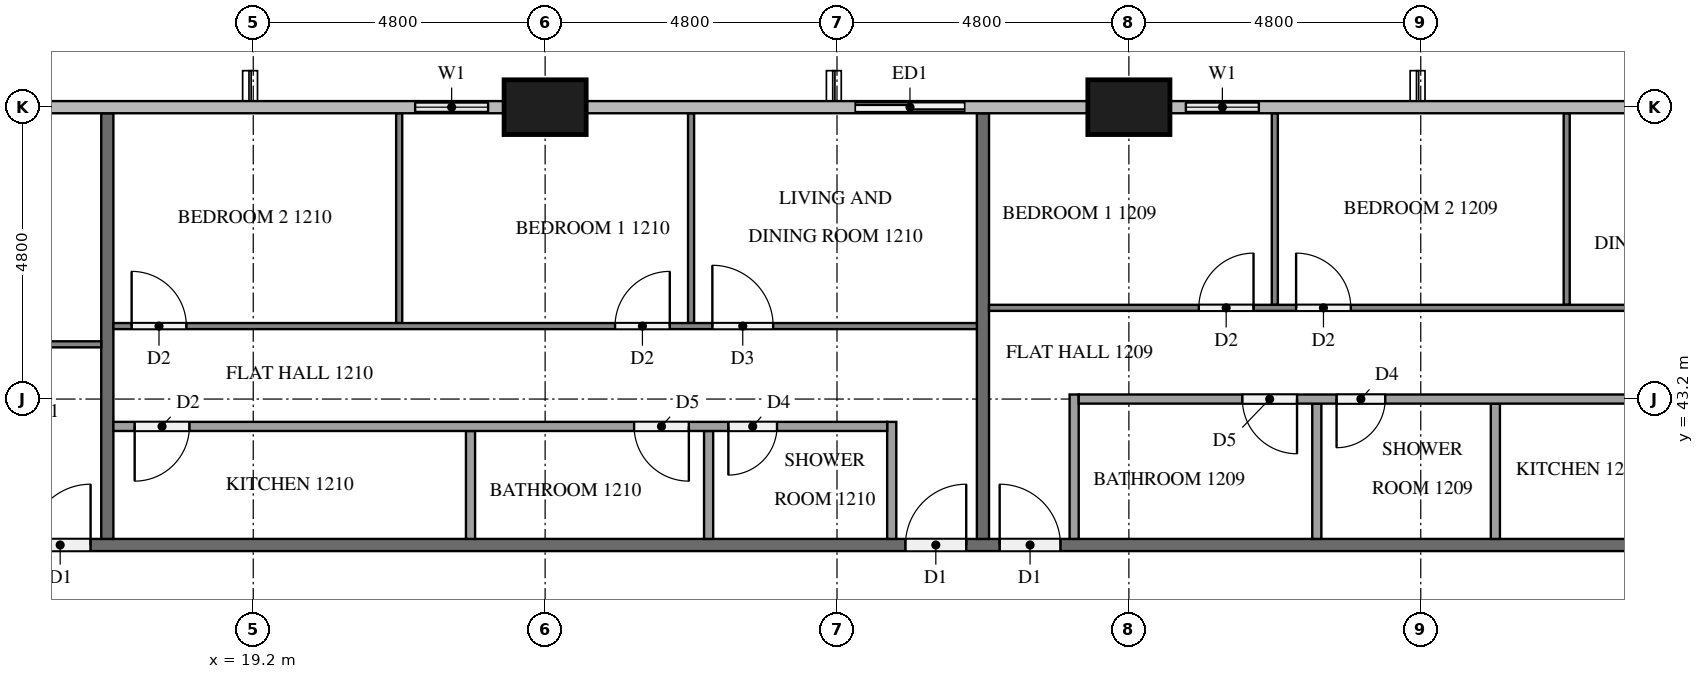
"""IFC4 building model, lengths in metres.
Left out: names, types, materials, properties, quantities, classifications, styles, units other than length and angle.
Written with IfcOpenShell. Run it as: python <this file> out.ifc"""

import sys

from ifc_helpers import new_model, si_unit, direction, frame, frame_2d, origin, origin_2d, place, context, subcontext, project, spatial, rectangle, extrude, element, fill, save


model = new_model("IFC4")
c1 = context("Model", 3, precision=1e-05, world=origin(), true_north=direction((0.0, 1.0)))
c2 = subcontext(c1, "Body", "Model", "MODEL_VIEW")
j1 = project(units=[si_unit("LENGTHUNIT", "METRE"), si_unit("PLANEANGLEUNIT", "RADIAN")], contexts=[c1])
p1 = place(None, origin())
s1 = spatial("IfcSite", under=j1, at=p1, CompositionType="ELEMENT")
p2 = place(p1, origin())
s2 = spatial("IfcBuilding", under=s1, at=p2, CompositionType="ELEMENT")
p3 = place(p2, frame((0.0, 0.0, 50.4)))
s3 = spatial("IfcBuildingStorey", under=s2, at=p3, CompositionType="ELEMENT", Elevation=50.4)
for number, where, z_axis, x_axis in (
    (1, (33.6, 48.0, 0.0), (0.0, 0.0, 1.0), (1.0, 0.0, 0.0)),
    (2, (24.0, 48.0, 0.0), (0.0, 0.0, 1.0), (1.0, 0.0, 0.0)),
):
    element("IfcColumn", number, at=place(p3, frame(where, z_axis=z_axis, x_axis=x_axis)), inside=s3, PredefinedType="COLUMN", context=c2, shape_type="SweptSolid", body=[
        extrude(rectangle(XDim=1.35, YDim=0.9, at=origin_2d()), origin(), (0.0, 0.0, 1.0), 3.1),
    ])
p4 = place(p3, frame((36.0, 48.0, 0.0), z_axis=(0.0, 0.0, 1.0), x_axis=(-1.0, 0.0, 0.0)))
e3 = element("IfcWall", 3, at=p4, inside=s3, PredefinedType="SOLIDWALL", context=c2, shape_type="SweptSolid", body=[
    extrude(rectangle(XDim=1.725, YDim=0.15, at=frame_2d((0.863, 0.0))), origin(), (0.0, 0.0, 1.0), 3.1),
])
p5 = place(p4, frame((0.262, 0.0, 0.9)))
e4 = element("IfcOpeningElement", 4, at=p5, cuts=e3, PredefinedType="OPENING", context=c2, shape_type="SweptSolid", body=[
    extrude(rectangle(XDim=1.2, YDim=1.4, at=frame_2d((0.6, 0.7))), frame((0.0, 0.085, 0.0), z_axis=(0.0, -1.0, 0.0), x_axis=(1.0, 0.0, 0.0)), (0.0, 0.0, 1.0), 0.17),
])
p6 = place(p3, frame((31.2, 48.0, 0.0), z_axis=(0.0, 0.0, 1.0), x_axis=(-1.0, 0.0, 0.0)))
e5 = element("IfcWall", 5, at=p6, inside=s3, PredefinedType="SOLIDWALL", context=c2, shape_type="SweptSolid", body=[
    extrude(rectangle(XDim=2.4, YDim=0.15, at=frame_2d((1.2, 0.0))), origin(), (0.0, 0.0, 1.0), 3.1),
])
p7 = place(p6, frame((0.3, 0.0, 0.0)))
e6 = element("IfcOpeningElement", 6, at=p7, cuts=e5, PredefinedType="OPENING", context=c2, shape_type="SweptSolid", body=[
    extrude(rectangle(XDim=1.8, YDim=2.4, at=frame_2d((0.9, 1.2))), frame((0.0, 0.085, 0.0), z_axis=(0.0, -1.0, 0.0), x_axis=(1.0, 0.0, 0.0)), (0.0, 0.0, 1.0), 0.17),
])
p8 = place(p3, frame((23.325, 48.0, 0.0), z_axis=(0.0, 0.0, 1.0), x_axis=(-1.0, 0.0, 0.0)))
e7 = element("IfcWall", 7, at=p8, inside=s3, PredefinedType="SOLIDWALL", context=c2, shape_type="SweptSolid", body=[
    extrude(rectangle(XDim=1.725, YDim=0.15, at=frame_2d((0.862, 0.0))), origin(), (0.0, 0.0, 1.0), 3.1),
])
p9 = place(p8, frame((0.262, 0.0, 0.9)))
e8 = element("IfcOpeningElement", 8, at=p9, cuts=e7, PredefinedType="OPENING", context=c2, shape_type="SweptSolid", body=[
    extrude(rectangle(XDim=1.2, YDim=1.4, at=frame_2d((0.6, 0.7))), frame((0.0, 0.085, 0.0), z_axis=(0.0, -1.0, 0.0), x_axis=(1.0, 0.0, 0.0)), (0.0, 0.0, 1.0), 0.17),
])
p10 = place(p3, frame((11.9, 40.8, 0.0), z_axis=(0.0, 0.0, 1.0), x_axis=(1.0, 0.0, 0.0)))
e9 = element("IfcWall", 9, at=p10, inside=s3, PredefinedType="PARTITIONING", context=c2, shape_type="SweptSolid", body=[
    extrude(rectangle(XDim=38.6, YDim=0.2, at=frame_2d((19.3, 0.0))), origin(), (0.0, 0.0, 1.0), 3.1),
])
p11 = place(p10, frame((33.975, 0.0, 0.0)))
e10 = element("IfcOpeningElement", 10, at=p11, cuts=e9, PredefinedType="OPENING", context=c2, shape_type="SweptSolid", body=[
    extrude(rectangle(XDim=1.0, YDim=2.1, at=frame_2d((0.5, 1.05))), frame((0.0, 0.11, 0.0), z_axis=(0.0, -1.0, 0.0), x_axis=(1.0, 0.0, 0.0)), (0.0, 0.0, 1.0), 0.22),
])
p12 = place(p10, frame((19.575, 0.0, 0.0)))
e11 = element("IfcOpeningElement", 11, at=p12, cuts=e9, PredefinedType="OPENING", context=c2, shape_type="SweptSolid", body=[
    extrude(rectangle(XDim=1.0, YDim=2.1, at=frame_2d((0.5, 1.05))), frame((0.0, 0.11, 0.0), z_axis=(0.0, -1.0, 0.0), x_axis=(1.0, 0.0, 0.0)), (0.0, 0.0, 1.0), 0.22),
])
p13 = place(p10, frame((18.025, 0.0, 0.0)))
e12 = element("IfcOpeningElement", 12, at=p13, cuts=e9, PredefinedType="OPENING", context=c2, shape_type="SweptSolid", body=[
    extrude(rectangle(XDim=1.0, YDim=2.1, at=frame_2d((0.5, 1.05))), frame((0.0, 0.11, 0.0), z_axis=(0.0, -1.0, 0.0), x_axis=(1.0, 0.0, 0.0)), (0.0, 0.0, 1.0), 0.22),
])
p14 = place(p10, frame((3.625, 0.0, 0.0)))
e13 = element("IfcOpeningElement", 13, at=p14, cuts=e9, PredefinedType="OPENING", context=c2, shape_type="SweptSolid", body=[
    extrude(rectangle(XDim=1.0, YDim=2.1, at=frame_2d((0.5, 1.05))), frame((0.0, 0.11, 0.0), z_axis=(0.0, -1.0, 0.0), x_axis=(1.0, 0.0, 0.0)), (0.0, 0.0, 1.0), 0.22),
])
for number, where, z_axis, x_axis in (
    (14, (31.2, 47.9, 0.0), (0.0, 0.0, 1.0), (0.0, -1.0, 0.0)),
    (15, (16.8, 47.9, 0.0), (0.0, 0.0, 1.0), (0.0, -1.0, 0.0)),
):
    element("IfcWall", number, at=place(p3, frame(where, z_axis=z_axis, x_axis=x_axis)), inside=s3, PredefinedType="PARTITIONING", context=c2, shape_type="SweptSolid", body=[
        extrude(rectangle(XDim=7.0, YDim=0.2, at=frame_2d((3.5, 0.0))), origin(), (0.0, 0.0, 1.0), 3.1),
    ])
for number, where, z_axis, x_axis in (
    (16, (36.0, 44.75, 0.0), (0.0, 0.0, 1.0), (0.0, 1.0, 0.0)),
    (17, (40.8, 44.75, 0.0), (0.0, 0.0, 1.0), (0.0, 1.0, 0.0)),
):
    element("IfcWall", number, at=place(p3, frame(where, z_axis=z_axis, x_axis=x_axis)), inside=s3, PredefinedType="PARTITIONING", context=c2, shape_type="SweptSolid", body=[
        extrude(rectangle(XDim=3.15, YDim=0.1, at=frame_2d((1.575, 0.0))), origin(), (0.0, 0.0, 1.0), 3.1),
    ])
p15 = place(p3, frame((31.3, 44.7, 0.0), z_axis=(0.0, 0.0, 1.0), x_axis=(1.0, 0.0, 0.0)))
e18 = element("IfcWall", 18, at=p15, inside=s3, PredefinedType="PARTITIONING", context=c2, shape_type="SweptSolid", body=[
    extrude(rectangle(XDim=14.2, YDim=0.1, at=frame_2d((7.1, 0.0))), origin(), (0.0, 0.0, 1.0), 3.1),
])
p16 = place(p15, frame((3.45, 0.0, 0.0)))
e19 = element("IfcOpeningElement", 19, at=p16, cuts=e18, PredefinedType="OPENING", context=c2, shape_type="SweptSolid", body=[
    extrude(rectangle(XDim=0.9, YDim=2.1, at=frame_2d((0.45, 1.05))), frame((0.0, 0.06, 0.0), z_axis=(0.0, -1.0, 0.0), x_axis=(1.0, 0.0, 0.0)), (0.0, 0.0, 1.0), 0.12),
])
p17 = place(p15, frame((5.05, 0.0, 0.0)))
e20 = element("IfcOpeningElement", 20, at=p17, cuts=e18, PredefinedType="OPENING", context=c2, shape_type="SweptSolid", body=[
    extrude(rectangle(XDim=0.9, YDim=2.1, at=frame_2d((0.45, 1.05))), frame((0.0, 0.06, 0.0), z_axis=(0.0, -1.0, 0.0), x_axis=(1.0, 0.0, 0.0)), (0.0, 0.0, 1.0), 0.12),
])
p18 = place(p15, frame((12.9, 0.0, 0.0)))
e21 = element("IfcOpeningElement", 21, at=p18, cuts=e18, PredefinedType="OPENING", context=c2, shape_type="SweptSolid", body=[
    extrude(rectangle(XDim=1.0, YDim=2.1, at=frame_2d((0.5, 1.05))), frame((0.0, 0.06, 0.0), z_axis=(0.0, -1.0, 0.0), x_axis=(1.0, 0.0, 0.0)), (0.0, 0.0, 1.0), 0.12),
])
for number, where, z_axis, x_axis in (
    (22, (36.69, 40.9, 0.0), (0.0, 0.0, 1.0), (0.0, 1.0, 0.0)),
    (23, (39.627, 40.9, 0.0), (0.0, 0.0, 1.0), (0.0, 1.0, 0.0)),
):
    element("IfcWall", number, at=place(p3, frame(where, z_axis=z_axis, x_axis=x_axis)), inside=s3, PredefinedType="PARTITIONING", context=c2, shape_type="SweptSolid", body=[
        extrude(rectangle(XDim=2.225, YDim=0.15, at=frame_2d((1.113, 0.0))), origin(), (0.0, 0.0, 1.0), 3.1),
    ])
p19 = place(p3, frame((32.7, 40.9, 0.0), z_axis=(0.0, 0.0, 1.0), x_axis=(0.0, 1.0, 0.0)))
e24 = element("IfcWall", 24, at=p19, inside=s3, PredefinedType="PARTITIONING", context=c2, shape_type="SweptSolid", body=[
    extrude(rectangle(XDim=2.375, YDim=0.15, at=frame_2d((1.188, 0.0))), origin(), (0.0, 0.0, 1.0), 3.1),
])
p20 = place(p3, frame((45.5, 43.2, 0.0), z_axis=(0.0, 0.0, 1.0), x_axis=(-1.0, 0.0, 0.0)))
e25 = element("IfcWall", 25, at=p20, inside=s3, PredefinedType="PARTITIONING", context=c2, shape_type="SweptSolid", body=[
    extrude(rectangle(XDim=12.725, YDim=0.15, at=frame_2d((6.363, 0.0))), origin(), (0.0, 0.0, 1.0), 3.1),
])
p21 = place(p20, frame((9.135, 0.0, 0.0)))
e26 = element("IfcOpeningElement", 26, at=p21, cuts=e25, PredefinedType="OPENING", context=c2, shape_type="SweptSolid", body=[
    extrude(rectangle(XDim=0.9, YDim=2.1, at=frame_2d((0.45, 1.05))), frame((0.0, 0.085, 0.0), z_axis=(0.0, -1.0, 0.0), x_axis=(1.0, 0.0, 0.0)), (0.0, 0.0, 1.0), 0.17),
])
p22 = place(p20, frame((7.685, 0.0, 0.0)))
e27 = element("IfcOpeningElement", 27, at=p22, cuts=e25, PredefinedType="OPENING", context=c2, shape_type="SweptSolid", body=[
    extrude(rectangle(XDim=0.8, YDim=2.1, at=frame_2d((0.4, 1.05))), frame((0.0, 0.085, 0.0), z_axis=(0.0, -1.0, 0.0), x_axis=(1.0, 0.0, 0.0)), (0.0, 0.0, 1.0), 0.17),
])
p23 = place(p20, frame((0.35, 0.0, 0.0)))
e28 = element("IfcOpeningElement", 28, at=p23, cuts=e25, PredefinedType="OPENING", context=c2, shape_type="SweptSolid", body=[
    extrude(rectangle(XDim=0.9, YDim=2.1, at=frame_2d((0.45, 1.05))), frame((0.0, 0.085, 0.0), z_axis=(0.0, -1.0, 0.0), x_axis=(1.0, 0.0, 0.0)), (0.0, 0.0, 1.0), 0.17),
])
for number, where, z_axis, x_axis in (
    (29, (26.4, 44.45, 0.0), (0.0, 0.0, 1.0), (0.0, 1.0, 0.0)),
    (30, (21.6, 44.45, 0.0), (0.0, 0.0, 1.0), (0.0, 1.0, 0.0)),
):
    element("IfcWall", number, at=place(p3, frame(where, z_axis=z_axis, x_axis=x_axis)), inside=s3, PredefinedType="PARTITIONING", context=c2, shape_type="SweptSolid", body=[
        extrude(rectangle(XDim=3.45, YDim=0.1, at=frame_2d((1.725, 0.0))), origin(), (0.0, 0.0, 1.0), 3.1),
    ])
p24 = place(p3, frame((16.9, 44.4, 0.0), z_axis=(0.0, 0.0, 1.0), x_axis=(1.0, 0.0, 0.0)))
e31 = element("IfcWall", 31, at=p24, inside=s3, PredefinedType="PARTITIONING", context=c2, shape_type="SweptSolid", body=[
    extrude(rectangle(XDim=14.2, YDim=0.1, at=frame_2d((7.1, 0.0))), origin(), (0.0, 0.0, 1.0), 3.1),
])
p25 = place(p24, frame((9.85, 0.0, 0.0)))
e32 = element("IfcOpeningElement", 32, at=p25, cuts=e31, PredefinedType="OPENING", context=c2, shape_type="SweptSolid", body=[
    extrude(rectangle(XDim=1.0, YDim=2.1, at=frame_2d((0.5, 1.05))), frame((0.0, 0.06, 0.0), z_axis=(0.0, -1.0, 0.0), x_axis=(1.0, 0.0, 0.0)), (0.0, 0.0, 1.0), 0.12),
])
p26 = place(p24, frame((8.25, 0.0, 0.0)))
e33 = element("IfcOpeningElement", 33, at=p26, cuts=e31, PredefinedType="OPENING", context=c2, shape_type="SweptSolid", body=[
    extrude(rectangle(XDim=0.9, YDim=2.1, at=frame_2d((0.45, 1.05))), frame((0.0, 0.06, 0.0), z_axis=(0.0, -1.0, 0.0), x_axis=(1.0, 0.0, 0.0)), (0.0, 0.0, 1.0), 0.12),
])
p27 = place(p24, frame((0.3, 0.0, 0.0)))
e34 = element("IfcOpeningElement", 34, at=p27, cuts=e31, PredefinedType="OPENING", context=c2, shape_type="SweptSolid", body=[
    extrude(rectangle(XDim=0.9, YDim=2.1, at=frame_2d((0.45, 1.05))), frame((0.0, 0.06, 0.0), z_axis=(0.0, -1.0, 0.0), x_axis=(1.0, 0.0, 0.0)), (0.0, 0.0, 1.0), 0.12),
])
for number, where, z_axis, x_axis in (
    (35, (26.688, 40.9, 0.0), (0.0, 0.0, 1.0), (0.0, 1.0, 0.0)),
    (36, (22.773, 40.9, 0.0), (0.0, 0.0, 1.0), (0.0, 1.0, 0.0)),
):
    element("IfcWall", number, at=place(p3, frame(where, z_axis=z_axis, x_axis=x_axis)), inside=s3, PredefinedType="PARTITIONING", context=c2, shape_type="SweptSolid", body=[
        extrude(rectangle(XDim=1.775, YDim=0.15, at=frame_2d((0.888, 0.0))), origin(), (0.0, 0.0, 1.0), 3.1),
    ])
p28 = place(p3, frame((29.7, 40.9, 0.0), z_axis=(0.0, 0.0, 1.0), x_axis=(0.0, 1.0, 0.0)))
e37 = element("IfcWall", 37, at=p28, inside=s3, PredefinedType="PARTITIONING", context=c2, shape_type="SweptSolid", body=[
    extrude(rectangle(XDim=1.925, YDim=0.15, at=frame_2d((0.962, 0.0))), origin(), (0.0, 0.0, 1.0), 3.1),
])
p29 = place(p3, frame((29.625, 42.75, 0.0), z_axis=(0.0, 0.0, 1.0), x_axis=(-1.0, 0.0, 0.0)))
e38 = element("IfcWall", 38, at=p29, inside=s3, PredefinedType="PARTITIONING", context=c2, shape_type="SweptSolid", body=[
    extrude(rectangle(XDim=12.725, YDim=0.15, at=frame_2d((6.363, 0.0))), origin(), (0.0, 0.0, 1.0), 3.1),
])
p30 = place(p29, frame((1.812, 0.0, 0.0)))
e39 = element("IfcOpeningElement", 39, at=p30, cuts=e38, PredefinedType="OPENING", context=c2, shape_type="SweptSolid", body=[
    extrude(rectangle(XDim=0.8, YDim=2.1, at=frame_2d((0.4, 1.05))), frame((0.0, 0.085, 0.0), z_axis=(0.0, -1.0, 0.0), x_axis=(1.0, 0.0, 0.0)), (0.0, 0.0, 1.0), 0.17),
])
p31 = place(p29, frame((3.261, 0.0, 0.0)))
e40 = element("IfcOpeningElement", 40, at=p31, cuts=e38, PredefinedType="OPENING", context=c2, shape_type="SweptSolid", body=[
    extrude(rectangle(XDim=0.9, YDim=2.1, at=frame_2d((0.45, 1.05))), frame((0.0, 0.085, 0.0), z_axis=(0.0, -1.0, 0.0), x_axis=(1.0, 0.0, 0.0)), (0.0, 0.0, 1.0), 0.17),
])
p32 = place(p29, frame((11.475, 0.0, 0.0)))
e41 = element("IfcOpeningElement", 41, at=p32, cuts=e38, PredefinedType="OPENING", context=c2, shape_type="SweptSolid", body=[
    extrude(rectangle(XDim=0.9, YDim=2.1, at=frame_2d((0.45, 1.05))), frame((0.0, 0.085, 0.0), z_axis=(0.0, -1.0, 0.0), x_axis=(1.0, 0.0, 0.0)), (0.0, 0.0, 1.0), 0.17),
])
p33 = place(p3, frame((0.341, 44.1, 0.0), z_axis=(0.0, 0.0, 1.0), x_axis=(1.0, 0.0, 0.0)))
e42 = element("IfcWall", 42, at=p33, inside=s3, PredefinedType="PARTITIONING", context=c2, shape_type="SweptSolid", body=[
    extrude(rectangle(XDim=16.359, YDim=0.1, at=frame_2d((8.179, 0.0))), origin(), (0.0, 0.0, 1.0), 3.1),
])
p34 = place(p33, frame((12.009, 0.0, 0.0)))
e43 = element("IfcOpeningElement", 43, at=p34, cuts=e42, PredefinedType="OPENING", context=c2, shape_type="SweptSolid", body=[
    extrude(rectangle(XDim=0.9, YDim=2.1, at=frame_2d((0.45, 1.05))), frame((0.0, 0.06, 0.0), z_axis=(0.0, -1.0, 0.0), x_axis=(1.0, 0.0, 0.0)), (0.0, 0.0, 1.0), 0.12),
])
p35 = place(p33, frame((10.309, 0.0, 0.0)))
e44 = element("IfcOpeningElement", 44, at=p35, cuts=e42, PredefinedType="OPENING", context=c2, shape_type="SweptSolid", body=[
    extrude(rectangle(XDim=1.0, YDim=2.1, at=frame_2d((0.5, 1.05))), frame((0.0, 0.06, 0.0), z_axis=(0.0, -1.0, 0.0), x_axis=(1.0, 0.0, 0.0)), (0.0, 0.0, 1.0), 0.12),
])
p36 = place(p33, frame((0.3, 0.0, 0.0)))
e45 = element("IfcOpeningElement", 45, at=p36, cuts=e42, PredefinedType="OPENING", context=c2, shape_type="SweptSolid", body=[
    extrude(rectangle(XDim=0.9, YDim=2.1, at=frame_2d((0.45, 1.05))), frame((0.0, 0.06, 0.0), z_axis=(0.0, -1.0, 0.0), x_axis=(1.0, 0.0, 0.0)), (0.0, 0.0, 1.0), 0.12),
])
p37 = place(p5, origin())
e46 = element("IfcWindow", 46, at=p37, inside=s3, PartitioningType="SINGLE_PANEL", PredefinedType="WINDOW", context=c2, shape_type="SweptSolid", body=[
    extrude(rectangle(XDim=1.2, YDim=1.4, at=frame_2d((0.6, 0.7))), frame((0.0, 0.03, 0.0), z_axis=(0.0, -1.0, 0.0), x_axis=(1.0, 0.0, 0.0)), (0.0, 0.0, 1.0), 0.06),
])
fill(e4, e46)
p38 = place(p7, origin())
e47 = element("IfcDoor", 47, at=p38, inside=s3, OperationType="SLIDING_TO_LEFT", PredefinedType="DOOR", context=c2, shape_type="SweptSolid", body=[
    extrude(rectangle(XDim=1.8, YDim=2.4, at=frame_2d((0.9, 1.2))), frame((0.0, 0.025, 0.0), z_axis=(0.0, -1.0, 0.0), x_axis=(1.0, 0.0, 0.0)), (0.0, 0.0, 1.0), 0.05),
])
fill(e6, e47)
p39 = place(p9, origin())
e48 = element("IfcWindow", 48, at=p39, inside=s3, PartitioningType="SINGLE_PANEL", PredefinedType="WINDOW", context=c2, shape_type="SweptSolid", body=[
    extrude(rectangle(XDim=1.2, YDim=1.4, at=frame_2d((0.6, 0.7))), frame((0.0, 0.03, 0.0), z_axis=(0.0, -1.0, 0.0), x_axis=(1.0, 0.0, 0.0)), (0.0, 0.0, 1.0), 0.06),
])
fill(e8, e48)
p40 = place(p12, origin())
e49 = element("IfcDoor", 49, at=p40, inside=s3, OperationType="SINGLE_SWING_LEFT", PredefinedType="DOOR", context=c2, shape_type="SweptSolid", body=[
    extrude(rectangle(XDim=1.0, YDim=2.1, at=frame_2d((0.5, 1.05))), frame((0.0, 0.025, 0.0), z_axis=(0.0, -1.0, 0.0), x_axis=(1.0, 0.0, 0.0)), (0.0, 0.0, 1.0), 0.05),
])
fill(e11, e49)
p41 = place(p13, origin())
e50 = element("IfcDoor", 50, at=p41, inside=s3, OperationType="SINGLE_SWING_RIGHT", PredefinedType="DOOR", context=c2, shape_type="SweptSolid", body=[
    extrude(rectangle(XDim=1.0, YDim=2.1, at=frame_2d((0.5, 1.05))), frame((0.0, 0.025, 0.0), z_axis=(0.0, -1.0, 0.0), x_axis=(1.0, 0.0, 0.0)), (0.0, 0.0, 1.0), 0.05),
])
fill(e12, e50)
p42 = place(p14, origin())
e51 = element("IfcDoor", 51, at=p42, inside=s3, OperationType="SINGLE_SWING_RIGHT", PredefinedType="DOOR", context=c2, shape_type="SweptSolid", body=[
    extrude(rectangle(XDim=1.0, YDim=2.1, at=frame_2d((0.5, 1.05))), frame((0.0, 0.025, 0.0), z_axis=(0.0, -1.0, 0.0), x_axis=(1.0, 0.0, 0.0)), (0.0, 0.0, 1.0), 0.05),
])
fill(e13, e51)
p43 = place(p16, origin())
e52 = element("IfcDoor", 52, at=p43, inside=s3, OperationType="SINGLE_SWING_RIGHT", PredefinedType="DOOR", context=c2, shape_type="SweptSolid", body=[
    extrude(rectangle(XDim=0.9, YDim=2.1, at=frame_2d((0.45, 1.05))), frame((0.0, 0.025, 0.0), z_axis=(0.0, -1.0, 0.0), x_axis=(1.0, 0.0, 0.0)), (0.0, 0.0, 1.0), 0.05),
])
fill(e19, e52)
p44 = place(p17, origin())
e53 = element("IfcDoor", 53, at=p44, inside=s3, OperationType="SINGLE_SWING_LEFT", PredefinedType="DOOR", context=c2, shape_type="SweptSolid", body=[
    extrude(rectangle(XDim=0.9, YDim=2.1, at=frame_2d((0.45, 1.05))), frame((0.0, 0.025, 0.0), z_axis=(0.0, -1.0, 0.0), x_axis=(1.0, 0.0, 0.0)), (0.0, 0.0, 1.0), 0.05),
])
fill(e20, e53)
p45 = place(p21, origin())
e54 = element("IfcDoor", 54, at=p45, inside=s3, OperationType="SINGLE_SWING_LEFT", PredefinedType="DOOR", context=c2, shape_type="SweptSolid", body=[
    extrude(rectangle(XDim=0.9, YDim=2.1, at=frame_2d((0.45, 1.05))), frame((0.0, 0.025, 0.0), z_axis=(0.0, -1.0, 0.0), x_axis=(1.0, 0.0, 0.0)), (0.0, 0.0, 1.0), 0.05),
])
fill(e26, e54)
p46 = place(p22, origin())
e55 = element("IfcDoor", 55, at=p46, inside=s3, OperationType="SINGLE_SWING_RIGHT", PredefinedType="DOOR", context=c2, shape_type="SweptSolid", body=[
    extrude(rectangle(XDim=0.8, YDim=2.1, at=frame_2d((0.4, 1.05))), frame((0.0, 0.025, 0.0), z_axis=(0.0, -1.0, 0.0), x_axis=(1.0, 0.0, 0.0)), (0.0, 0.0, 1.0), 0.05),
])
fill(e27, e55)
p47 = place(p25, origin())
e56 = element("IfcDoor", 56, at=p47, inside=s3, OperationType="SINGLE_SWING_LEFT", PredefinedType="DOOR", context=c2, shape_type="SweptSolid", body=[
    extrude(rectangle(XDim=1.0, YDim=2.1, at=frame_2d((0.5, 1.05))), frame((0.0, 0.025, 0.0), z_axis=(0.0, -1.0, 0.0), x_axis=(1.0, 0.0, 0.0)), (0.0, 0.0, 1.0), 0.05),
])
fill(e32, e56)
p48 = place(p26, origin())
e57 = element("IfcDoor", 57, at=p48, inside=s3, OperationType="SINGLE_SWING_RIGHT", PredefinedType="DOOR", context=c2, shape_type="SweptSolid", body=[
    extrude(rectangle(XDim=0.9, YDim=2.1, at=frame_2d((0.45, 1.05))), frame((0.0, 0.025, 0.0), z_axis=(0.0, -1.0, 0.0), x_axis=(1.0, 0.0, 0.0)), (0.0, 0.0, 1.0), 0.05),
])
fill(e33, e57)
p49 = place(p27, origin())
e58 = element("IfcDoor", 58, at=p49, inside=s3, OperationType="SINGLE_SWING_LEFT", PredefinedType="DOOR", context=c2, shape_type="SweptSolid", body=[
    extrude(rectangle(XDim=0.9, YDim=2.1, at=frame_2d((0.45, 1.05))), frame((0.0, 0.025, 0.0), z_axis=(0.0, -1.0, 0.0), x_axis=(1.0, 0.0, 0.0)), (0.0, 0.0, 1.0), 0.05),
])
fill(e34, e58)
p50 = place(p30, origin())
e59 = element("IfcDoor", 59, at=p50, inside=s3, OperationType="SINGLE_SWING_RIGHT", PredefinedType="DOOR", context=c2, shape_type="SweptSolid", body=[
    extrude(rectangle(XDim=0.8, YDim=2.1, at=frame_2d((0.4, 1.05))), frame((0.0, 0.025, 0.0), z_axis=(0.0, -1.0, 0.0), x_axis=(1.0, 0.0, 0.0)), (0.0, 0.0, 1.0), 0.05),
])
fill(e39, e59)
p51 = place(p31, origin())
e60 = element("IfcDoor", 60, at=p51, inside=s3, OperationType="SINGLE_SWING_LEFT", PredefinedType="DOOR", context=c2, shape_type="SweptSolid", body=[
    extrude(rectangle(XDim=0.9, YDim=2.1, at=frame_2d((0.45, 1.05))), frame((0.0, 0.025, 0.0), z_axis=(0.0, -1.0, 0.0), x_axis=(1.0, 0.0, 0.0)), (0.0, 0.0, 1.0), 0.05),
])
fill(e40, e60)
p52 = place(p32, origin())
e61 = element("IfcDoor", 61, at=p52, inside=s3, OperationType="SINGLE_SWING_RIGHT", PredefinedType="DOOR", context=c2, shape_type="SweptSolid", body=[
    extrude(rectangle(XDim=0.9, YDim=2.1, at=frame_2d((0.45, 1.05))), frame((0.0, 0.025, 0.0), z_axis=(0.0, -1.0, 0.0), x_axis=(1.0, 0.0, 0.0)), (0.0, 0.0, 1.0), 0.05),
])
fill(e41, e61)
save(model, sys.argv[1])
